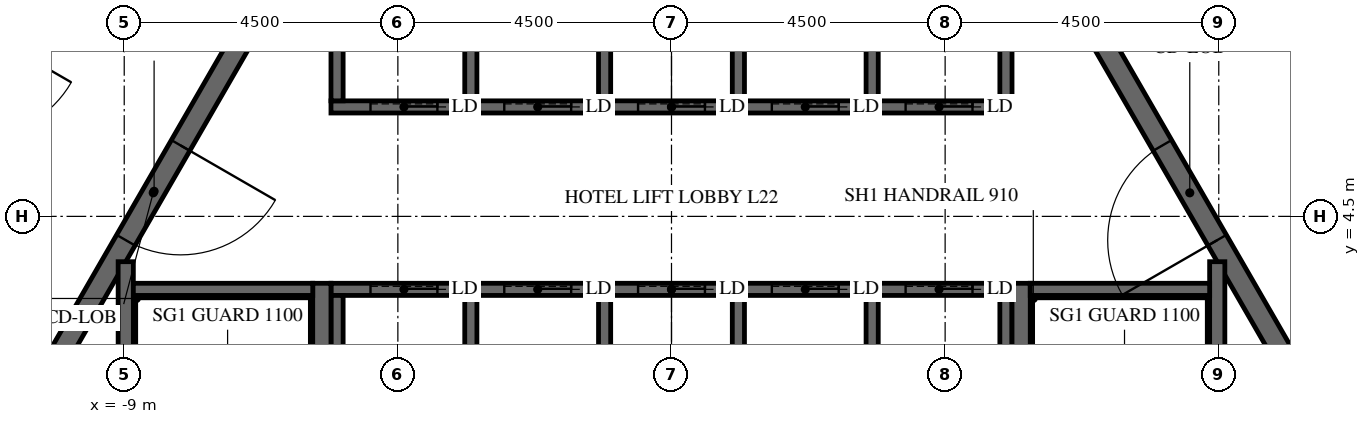
"""IFC4 building model, lengths in metres.
Left out: names, types, materials, properties, quantities, classifications, styles, units other than length and angle.
Written with IfcOpenShell. Run it as: python <this file> out.ifc"""

import sys

from ifc_helpers import new_model, si_unit, direction, frame, frame_2d, origin, place, context, subcontext, project, spatial, polyline, rectangle, outline, extrude, element, fill, save


model = new_model("IFC4")
c1 = context("Model", 3, precision=1e-05, world=origin(), true_north=direction((0.0, 1.0)))
c2 = subcontext(c1, "Body", "Model", "MODEL_VIEW")
j1 = project(units=[si_unit("LENGTHUNIT", "METRE"), si_unit("PLANEANGLEUNIT", "RADIAN")], contexts=[c1])
p1 = place(None, origin())
s1 = spatial("IfcSite", under=j1, at=p1, CompositionType="ELEMENT")
p2 = place(p1, origin())
s2 = spatial("IfcBuilding", under=s1, at=p2, CompositionType="ELEMENT")
p3 = place(p2, frame((0.0, 0.0, 99.9)))
s3 = spatial("IfcBuildingStorey", under=s2, at=p3, CompositionType="ELEMENT", Elevation=99.9)
p4 = place(p3, frame((-7.91, 13.7, -0.15), z_axis=(0.0, 0.0, 1.0), x_axis=(-0.499999880136, -0.866025472988, 0.0)))
e1 = element("IfcWall", 1, at=p4, inside=s3, PredefinedType="SHEAR", context=c2, shape_type="SweptSolid", body=[
    extrude(outline(polyline([(-0.173, -0.3), (15.993, -0.3), (15.646, 0.3), (0.173, 0.3), (-0.173, -0.3)])), origin(), (0.0, 0.0, 1.0), 3.9),
])
p5 = place(p4, frame((7.039, 0.0, 0.15)))
e2 = element("IfcOpeningElement", 2, at=p5, cuts=e1, PredefinedType="OPENING", context=c2, shape_type="SweptSolid", body=[
    extrude(rectangle(XDim=1.8, YDim=2.4, at=frame_2d((0.9, 1.2))), frame((0.0, 0.31, 0.0), z_axis=(0.0, -1.0, 0.0), x_axis=(1.0, 0.0, 0.0)), (0.0, 0.0, 1.0), 0.62),
])
p6 = place(p3, frame((15.819, 0.0, -0.15), z_axis=(0.0, 0.0, 1.0), x_axis=(-0.499999880136, 0.866025472988, 0.0)))
e3 = element("IfcWall", 3, at=p6, inside=s3, PredefinedType="SHEAR", context=c2, shape_type="SweptSolid", body=[
    extrude(outline(polyline([(-0.173, -0.3), (15.993, -0.3), (15.646, 0.3), (0.173, 0.3), (-0.173, -0.3)])), origin(), (0.0, 0.0, 1.0), 3.9),
])
p7 = place(p6, frame((6.981, 0.0, 0.15)))
e4 = element("IfcOpeningElement", 4, at=p7, cuts=e3, PredefinedType="OPENING", context=c2, shape_type="SweptSolid", body=[
    extrude(rectangle(XDim=1.8, YDim=2.4, at=frame_2d((0.9, 1.2))), frame((0.0, 0.31, 0.0), z_axis=(0.0, -1.0, 0.0), x_axis=(1.0, 0.0, 0.0)), (0.0, 0.0, 1.0), 0.62),
])
p8 = place(p3, frame((-5.673, 9.825, -0.15), z_axis=(0.0, 0.0, 1.0), x_axis=(-0.499995046907, -0.866028263435, 0.0)))
e5 = element("IfcWall", 5, at=p8, inside=s3, PredefinedType="SHEAR", context=c2, shape_type="SweptSolid", body=[
    extrude(outline(polyline([(-0.101, -0.175), (11.446, -0.175), (11.244, 0.175), (0.101, 0.175), (-0.101, -0.175)])), origin(), (0.0, 0.0, 1.0), 3.9),
])
p9 = place(p8, frame((4.801, 0.0, 0.15)))
e6 = element("IfcOpeningElement", 6, at=p9, cuts=e5, PredefinedType="OPENING", context=c2, shape_type="SweptSolid", body=[
    extrude(rectangle(XDim=1.8, YDim=2.4, at=frame_2d((0.9, 1.2))), frame((0.0, 0.185, 0.0), z_axis=(0.0, -1.0, 0.0), x_axis=(1.0, 0.0, 0.0)), (0.0, 0.0, 1.0), 0.37),
])
p10 = place(p3, frame((11.345, 0.0, -0.15), z_axis=(0.0, 0.0, 1.0), x_axis=(-0.499995046907, 0.866028263435, 0.0)))
e7 = element("IfcWall", 7, at=p10, inside=s3, PredefinedType="SHEAR", context=c2, shape_type="SweptSolid", body=[
    extrude(outline(polyline([(-0.101, -0.175), (11.446, -0.175), (11.244, 0.175), (0.101, 0.175), (-0.101, -0.175)])), origin(), (0.0, 0.0, 1.0), 3.9),
])
p11 = place(p10, frame((4.744, 0.0, 0.15)))
e8 = element("IfcOpeningElement", 8, at=p11, cuts=e7, PredefinedType="OPENING", context=c2, shape_type="SweptSolid", body=[
    extrude(rectangle(XDim=1.8, YDim=2.4, at=frame_2d((0.9, 1.2))), frame((0.0, 0.185, 0.0), z_axis=(0.0, -1.0, 0.0), x_axis=(1.0, 0.0, 0.0)), (0.0, 0.0, 1.0), 0.37),
])
p12 = place(p3, frame((-5.6, 6.3, -0.25), z_axis=(0.0, 0.0, 1.0), x_axis=(1.0, 0.0, 0.0)))
e9 = element("IfcWall", 9, at=p12, inside=s3, PredefinedType="SHEAR", context=c2, shape_type="SweptSolid", body=[
    extrude(rectangle(XDim=11.2, YDim=0.2, at=frame_2d((5.6, 0.0))), origin(), (0.0, 0.0, 1.0), 3.9),
])
p13 = place(p12, frame((0.65, 0.0, 0.25)))
e10 = element("IfcOpeningElement", 10, at=p13, cuts=e9, PredefinedType="OPENING", context=c2, shape_type="SweptSolid", body=[
    extrude(rectangle(XDim=1.1, YDim=2.1, at=frame_2d((0.55, 1.05))), frame((0.0, 0.11, 0.0), z_axis=(0.0, -1.0, 0.0), x_axis=(1.0, 0.0, 0.0)), (0.0, 0.0, 1.0), 0.22),
])
p14 = place(p12, frame((2.85, 0.0, 0.25)))
e11 = element("IfcOpeningElement", 11, at=p14, cuts=e9, PredefinedType="OPENING", context=c2, shape_type="SweptSolid", body=[
    extrude(rectangle(XDim=1.1, YDim=2.1, at=frame_2d((0.55, 1.05))), frame((0.0, 0.11, 0.0), z_axis=(0.0, -1.0, 0.0), x_axis=(1.0, 0.0, 0.0)), (0.0, 0.0, 1.0), 0.22),
])
p15 = place(p12, frame((5.05, 0.0, 0.25)))
e12 = element("IfcOpeningElement", 12, at=p15, cuts=e9, PredefinedType="OPENING", context=c2, shape_type="SweptSolid", body=[
    extrude(rectangle(XDim=1.1, YDim=2.1, at=frame_2d((0.55, 1.05))), frame((0.0, 0.11, 0.0), z_axis=(0.0, -1.0, 0.0), x_axis=(1.0, 0.0, 0.0)), (0.0, 0.0, 1.0), 0.22),
])
p16 = place(p12, frame((7.25, 0.0, 0.25)))
e13 = element("IfcOpeningElement", 13, at=p16, cuts=e9, PredefinedType="OPENING", context=c2, shape_type="SweptSolid", body=[
    extrude(rectangle(XDim=1.1, YDim=2.1, at=frame_2d((0.55, 1.05))), frame((0.0, 0.11, 0.0), z_axis=(0.0, -1.0, 0.0), x_axis=(1.0, 0.0, 0.0)), (0.0, 0.0, 1.0), 0.22),
])
p17 = place(p12, frame((9.45, 0.0, 0.25)))
e14 = element("IfcOpeningElement", 14, at=p17, cuts=e9, PredefinedType="OPENING", context=c2, shape_type="SweptSolid", body=[
    extrude(rectangle(XDim=1.1, YDim=2.1, at=frame_2d((0.55, 1.05))), frame((0.0, 0.11, 0.0), z_axis=(0.0, -1.0, 0.0), x_axis=(1.0, 0.0, 0.0)), (0.0, 0.0, 1.0), 0.22),
])
for number, where, z_axis, x_axis in (
    (15, (-5.5, 6.4, -0.25), (0.0, 0.0, 1.0), (0.0, 1.0, 0.0)),
    (16, (-3.3, 6.4, -0.25), (0.0, 0.0, 1.0), (0.0, 1.0, 0.0)),
    (17, (-1.1, 6.4, -0.25), (0.0, 0.0, 1.0), (0.0, 1.0, 0.0)),
    (18, (1.1, 6.4, -0.25), (0.0, 0.0, 1.0), (0.0, 1.0, 0.0)),
    (19, (3.3, 6.4, -0.25), (0.0, 0.0, 1.0), (0.0, 1.0, 0.0)),
    (20, (5.5, 6.4, -0.25), (0.0, 0.0, 1.0), (0.0, 1.0, 0.0)),
):
    element("IfcWall", number, at=place(p3, frame(where, z_axis=z_axis, x_axis=x_axis)), inside=s3, PredefinedType="SHEAR", context=c2, shape_type="SweptSolid", body=[
        extrude(rectangle(XDim=2.9, YDim=0.2, at=frame_2d((1.45, 0.0))), origin(), (0.0, 0.0, 1.0), 3.9),
    ])
p18 = place(p3, frame((-5.6, 3.3, -0.25), z_axis=(0.0, 0.0, 1.0), x_axis=(1.0, 0.0, 0.0)))
e21 = element("IfcWall", 21, at=p18, inside=s3, PredefinedType="SHEAR", context=c2, shape_type="SweptSolid", body=[
    extrude(rectangle(XDim=11.2, YDim=0.2, at=frame_2d((5.6, 0.0))), origin(), (0.0, 0.0, 1.0), 3.9),
])
p19 = place(p18, frame((0.65, 0.0, 0.25)))
e22 = element("IfcOpeningElement", 22, at=p19, cuts=e21, PredefinedType="OPENING", context=c2, shape_type="SweptSolid", body=[
    extrude(rectangle(XDim=1.1, YDim=2.1, at=frame_2d((0.55, 1.05))), frame((0.0, 0.11, 0.0), z_axis=(0.0, -1.0, 0.0), x_axis=(1.0, 0.0, 0.0)), (0.0, 0.0, 1.0), 0.22),
])
p20 = place(p18, frame((2.85, 0.0, 0.25)))
e23 = element("IfcOpeningElement", 23, at=p20, cuts=e21, PredefinedType="OPENING", context=c2, shape_type="SweptSolid", body=[
    extrude(rectangle(XDim=1.1, YDim=2.1, at=frame_2d((0.55, 1.05))), frame((0.0, 0.11, 0.0), z_axis=(0.0, -1.0, 0.0), x_axis=(1.0, 0.0, 0.0)), (0.0, 0.0, 1.0), 0.22),
])
p21 = place(p18, frame((5.05, 0.0, 0.25)))
e24 = element("IfcOpeningElement", 24, at=p21, cuts=e21, PredefinedType="OPENING", context=c2, shape_type="SweptSolid", body=[
    extrude(rectangle(XDim=1.1, YDim=2.1, at=frame_2d((0.55, 1.05))), frame((0.0, 0.11, 0.0), z_axis=(0.0, -1.0, 0.0), x_axis=(1.0, 0.0, 0.0)), (0.0, 0.0, 1.0), 0.22),
])
p22 = place(p18, frame((7.25, 0.0, 0.25)))
e25 = element("IfcOpeningElement", 25, at=p22, cuts=e21, PredefinedType="OPENING", context=c2, shape_type="SweptSolid", body=[
    extrude(rectangle(XDim=1.1, YDim=2.1, at=frame_2d((0.55, 1.05))), frame((0.0, 0.11, 0.0), z_axis=(0.0, -1.0, 0.0), x_axis=(1.0, 0.0, 0.0)), (0.0, 0.0, 1.0), 0.22),
])
p23 = place(p18, frame((9.45, 0.0, 0.25)))
e26 = element("IfcOpeningElement", 26, at=p23, cuts=e21, PredefinedType="OPENING", context=c2, shape_type="SweptSolid", body=[
    extrude(rectangle(XDim=1.1, YDim=2.1, at=frame_2d((0.55, 1.05))), frame((0.0, 0.11, 0.0), z_axis=(0.0, -1.0, 0.0), x_axis=(1.0, 0.0, 0.0)), (0.0, 0.0, 1.0), 0.22),
])
for number, where, z_axis, x_axis in (
    (27, (-5.5, 0.1, -0.25), (0.0, 0.0, 1.0), (0.0, 1.0, 0.0)),
    (28, (-3.3, 0.1, -0.25), (0.0, 0.0, 1.0), (0.0, 1.0, 0.0)),
    (29, (-1.1, 0.1, -0.25), (0.0, 0.0, 1.0), (0.0, 1.0, 0.0)),
    (30, (1.1, 0.1, -0.25), (0.0, 0.0, 1.0), (0.0, 1.0, 0.0)),
    (31, (3.3, 0.1, -0.25), (0.0, 0.0, 1.0), (0.0, 1.0, 0.0)),
    (32, (5.5, 0.1, -0.25), (0.0, 0.0, 1.0), (0.0, 1.0, 0.0)),
):
    element("IfcWall", number, at=place(p3, frame(where, z_axis=z_axis, x_axis=x_axis)), inside=s3, PredefinedType="SHEAR", context=c2, shape_type="SweptSolid", body=[
        extrude(rectangle(XDim=3.1, YDim=0.2, at=frame_2d((1.55, 0.0))), origin(), (0.0, 0.0, 1.0), 3.9),
    ])
p24 = place(p3, frame((5.75, -3.4, -0.25), z_axis=(0.0, 0.0, 1.0), x_axis=(0.0, 1.0, 0.0)))
e33 = element("IfcWall", 33, at=p24, inside=s3, PredefinedType="SHEAR", context=c2, shape_type="SweptSolid", body=[
    extrude(rectangle(XDim=6.8, YDim=0.3, at=frame_2d((3.4, 0.0))), origin(), (0.0, 0.0, 1.0), 3.9),
])
p25 = place(p3, frame((8.975, -3.755, -0.25), z_axis=(0.0, 0.0, 1.0), x_axis=(0.0, 1.0, 0.0)))
e34 = element("IfcWall", 34, at=p25, inside=s3, PredefinedType="SHEAR", context=c2, shape_type="SweptSolid", body=[
    extrude(rectangle(XDim=7.51, YDim=0.25, at=frame_2d((3.755, 0.0))), origin(), (0.0, 0.0, 1.0), 3.9),
])
p26 = place(p3, frame((5.9, 3.3, -0.25), z_axis=(0.0, 0.0, 1.0), x_axis=(1.0, 0.0, 0.0)))
e35 = element("IfcWall", 35, at=p26, inside=s3, PredefinedType="SHEAR", context=c2, shape_type="SweptSolid", body=[
    extrude(rectangle(XDim=2.95, YDim=0.2, at=frame_2d((1.475, 0.0))), origin(), (0.0, 0.0, 1.0), 3.9),
])
p27 = place(p3, frame((-5.75, -3.4, -0.25), z_axis=(0.0, 0.0, 1.0), x_axis=(0.0, 1.0, 0.0)))
e36 = element("IfcWall", 36, at=p27, inside=s3, PredefinedType="SHEAR", context=c2, shape_type="SweptSolid", body=[
    extrude(rectangle(XDim=6.8, YDim=0.3, at=frame_2d((3.4, 0.0))), origin(), (0.0, 0.0, 1.0), 3.9),
])
p28 = place(p3, frame((-8.975, -3.755, -0.25), z_axis=(0.0, 0.0, 1.0), x_axis=(0.0, 1.0, 0.0)))
e37 = element("IfcWall", 37, at=p28, inside=s3, PredefinedType="SHEAR", context=c2, shape_type="SweptSolid", body=[
    extrude(rectangle(XDim=7.51, YDim=0.25, at=frame_2d((3.755, 0.0))), origin(), (0.0, 0.0, 1.0), 3.9),
])
p29 = place(p3, frame((-8.85, 3.3, -0.25), z_axis=(0.0, 0.0, 1.0), x_axis=(1.0, 0.0, 0.0)))
e38 = element("IfcWall", 38, at=p29, inside=s3, PredefinedType="SHEAR", context=c2, shape_type="SweptSolid", body=[
    extrude(rectangle(XDim=2.95, YDim=0.2, at=frame_2d((1.475, 0.0))), origin(), (0.0, 0.0, 1.0), 3.9),
])
p30 = place(p9, origin())
e39 = element("IfcDoor", 39, at=p30, inside=s3, OperationType="DOUBLE_DOOR_SINGLE_SWING", PredefinedType="DOOR", context=c2, shape_type="SweptSolid", body=[
    extrude(rectangle(XDim=1.8, YDim=2.4, at=frame_2d((0.9, 1.2))), frame((0.0, 0.025, 0.0), z_axis=(0.0, -1.0, 0.0), x_axis=(1.0, 0.0, 0.0)), (0.0, 0.0, 1.0), 0.05),
])
fill(e6, e39)
p31 = place(p11, origin())
e40 = element("IfcDoor", 40, at=p31, inside=s3, OperationType="DOUBLE_DOOR_SINGLE_SWING", PredefinedType="DOOR", context=c2, shape_type="SweptSolid", body=[
    extrude(rectangle(XDim=1.8, YDim=2.4, at=frame_2d((0.9, 1.2))), frame((0.0, 0.025, 0.0), z_axis=(0.0, -1.0, 0.0), x_axis=(1.0, 0.0, 0.0)), (0.0, 0.0, 1.0), 0.05),
])
fill(e8, e40)
p32 = place(p13, origin())
e41 = element("IfcDoor", 41, at=p32, inside=s3, OperationType="SLIDING_TO_LEFT", PredefinedType="DOOR", context=c2, shape_type="SweptSolid", body=[
    extrude(rectangle(XDim=1.1, YDim=2.1, at=frame_2d((0.55, 1.05))), frame((0.0, 0.025, 0.0), z_axis=(0.0, -1.0, 0.0), x_axis=(1.0, 0.0, 0.0)), (0.0, 0.0, 1.0), 0.05),
])
fill(e10, e41)
p33 = place(p14, origin())
e42 = element("IfcDoor", 42, at=p33, inside=s3, OperationType="SLIDING_TO_LEFT", PredefinedType="DOOR", context=c2, shape_type="SweptSolid", body=[
    extrude(rectangle(XDim=1.1, YDim=2.1, at=frame_2d((0.55, 1.05))), frame((0.0, 0.025, 0.0), z_axis=(0.0, -1.0, 0.0), x_axis=(1.0, 0.0, 0.0)), (0.0, 0.0, 1.0), 0.05),
])
fill(e11, e42)
p34 = place(p15, origin())
e43 = element("IfcDoor", 43, at=p34, inside=s3, OperationType="SLIDING_TO_LEFT", PredefinedType="DOOR", context=c2, shape_type="SweptSolid", body=[
    extrude(rectangle(XDim=1.1, YDim=2.1, at=frame_2d((0.55, 1.05))), frame((0.0, 0.025, 0.0), z_axis=(0.0, -1.0, 0.0), x_axis=(1.0, 0.0, 0.0)), (0.0, 0.0, 1.0), 0.05),
])
fill(e12, e43)
p35 = place(p16, origin())
e44 = element("IfcDoor", 44, at=p35, inside=s3, OperationType="SLIDING_TO_LEFT", PredefinedType="DOOR", context=c2, shape_type="SweptSolid", body=[
    extrude(rectangle(XDim=1.1, YDim=2.1, at=frame_2d((0.55, 1.05))), frame((0.0, 0.025, 0.0), z_axis=(0.0, -1.0, 0.0), x_axis=(1.0, 0.0, 0.0)), (0.0, 0.0, 1.0), 0.05),
])
fill(e13, e44)
p36 = place(p17, origin())
e45 = element("IfcDoor", 45, at=p36, inside=s3, OperationType="SLIDING_TO_LEFT", PredefinedType="DOOR", context=c2, shape_type="SweptSolid", body=[
    extrude(rectangle(XDim=1.1, YDim=2.1, at=frame_2d((0.55, 1.05))), frame((0.0, 0.025, 0.0), z_axis=(0.0, -1.0, 0.0), x_axis=(1.0, 0.0, 0.0)), (0.0, 0.0, 1.0), 0.05),
])
fill(e14, e45)
p37 = place(p19, origin())
e46 = element("IfcDoor", 46, at=p37, inside=s3, OperationType="SLIDING_TO_LEFT", PredefinedType="DOOR", context=c2, shape_type="SweptSolid", body=[
    extrude(rectangle(XDim=1.1, YDim=2.1, at=frame_2d((0.55, 1.05))), frame((0.0, 0.025, 0.0), z_axis=(0.0, -1.0, 0.0), x_axis=(1.0, 0.0, 0.0)), (0.0, 0.0, 1.0), 0.05),
])
fill(e22, e46)
p38 = place(p20, origin())
e47 = element("IfcDoor", 47, at=p38, inside=s3, OperationType="SLIDING_TO_LEFT", PredefinedType="DOOR", context=c2, shape_type="SweptSolid", body=[
    extrude(rectangle(XDim=1.1, YDim=2.1, at=frame_2d((0.55, 1.05))), frame((0.0, 0.025, 0.0), z_axis=(0.0, -1.0, 0.0), x_axis=(1.0, 0.0, 0.0)), (0.0, 0.0, 1.0), 0.05),
])
fill(e23, e47)
p39 = place(p21, origin())
e48 = element("IfcDoor", 48, at=p39, inside=s3, OperationType="SLIDING_TO_LEFT", PredefinedType="DOOR", context=c2, shape_type="SweptSolid", body=[
    extrude(rectangle(XDim=1.1, YDim=2.1, at=frame_2d((0.55, 1.05))), frame((0.0, 0.025, 0.0), z_axis=(0.0, -1.0, 0.0), x_axis=(1.0, 0.0, 0.0)), (0.0, 0.0, 1.0), 0.05),
])
fill(e24, e48)
p40 = place(p22, origin())
e49 = element("IfcDoor", 49, at=p40, inside=s3, OperationType="SLIDING_TO_LEFT", PredefinedType="DOOR", context=c2, shape_type="SweptSolid", body=[
    extrude(rectangle(XDim=1.1, YDim=2.1, at=frame_2d((0.55, 1.05))), frame((0.0, 0.025, 0.0), z_axis=(0.0, -1.0, 0.0), x_axis=(1.0, 0.0, 0.0)), (0.0, 0.0, 1.0), 0.05),
])
fill(e25, e49)
p41 = place(p23, origin())
e50 = element("IfcDoor", 50, at=p41, inside=s3, OperationType="SLIDING_TO_LEFT", PredefinedType="DOOR", context=c2, shape_type="SweptSolid", body=[
    extrude(rectangle(XDim=1.1, YDim=2.1, at=frame_2d((0.55, 1.05))), frame((0.0, 0.025, 0.0), z_axis=(0.0, -1.0, 0.0), x_axis=(1.0, 0.0, 0.0)), (0.0, 0.0, 1.0), 0.05),
])
fill(e26, e50)
save(model, sys.argv[1])
